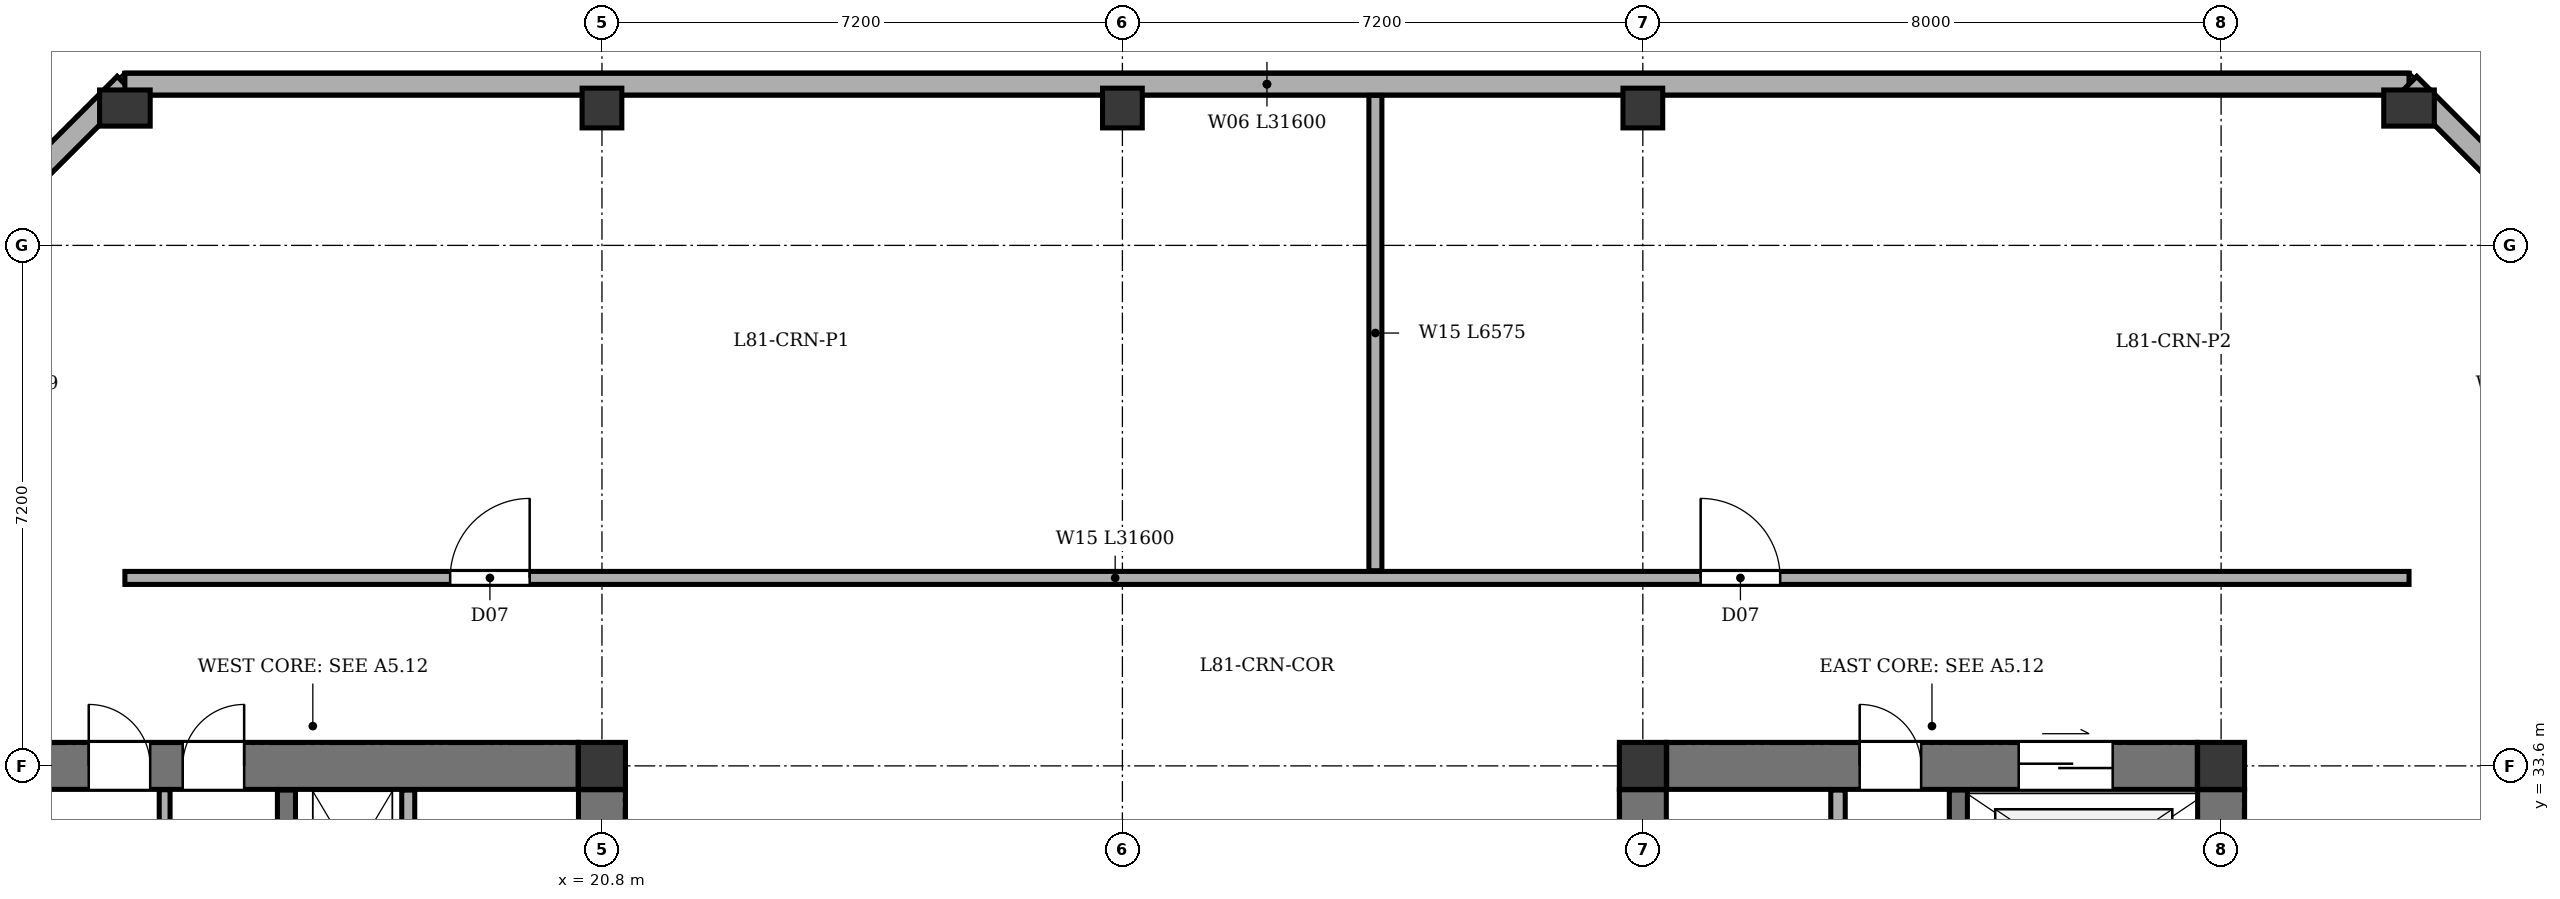
"""IFC4 building model, lengths in metres.
Left out: names, types, materials, properties, quantities, classifications, styles, units other than length and angle.
Written with IfcOpenShell. Run it as: python <this file> out.ifc"""

import sys

from ifc_helpers import new_model, si_unit, direction, frame, frame_2d, origin, origin_2d, place, context, subcontext, project, spatial, polyline, rectangle, outline, extrude, element, fill, save


model = new_model("IFC4")
c1 = context("Model", 3, precision=1e-05, world=origin(), true_north=direction((0.0, 1.0)))
c2 = subcontext(c1, "Body", "Model", "MODEL_VIEW")
j1 = project(units=[si_unit("LENGTHUNIT", "METRE"), si_unit("PLANEANGLEUNIT", "RADIAN")], contexts=[c1])
p1 = place(None, origin())
s1 = spatial("IfcSite", under=j1, at=p1, CompositionType="ELEMENT")
p2 = place(p1, origin())
s2 = spatial("IfcBuilding", under=s1, at=p2, CompositionType="ELEMENT")
p3 = place(p2, frame((0.0, 0.0, 309.0)))
s3 = spatial("IfcBuildingStorey", under=s2, at=p3, CompositionType="ELEMENT", Elevation=309.0)
for number, where, z_axis, x_axis in (
    (1, (20.8, 33.6, 0.0), (0.0, 0.0, 1.0), (1.0, 0.0, 0.0)),
    (2, (35.2, 33.6, 0.0), (0.0, 0.0, 1.0), (1.0, 0.0, 0.0)),
    (3, (43.2, 33.6, 0.0), (0.0, 0.0, 1.0), (1.0, 0.0, 0.0)),
):
    element("IfcColumn", number, at=place(p3, frame(where, z_axis=z_axis, x_axis=x_axis)), inside=s3, PredefinedType="COLUMN", context=c2, shape_type="SweptSolid", body=[
        extrude(rectangle(XDim=0.65, YDim=0.65, at=origin_2d()), origin(), (0.0, 0.0, 1.0), 4.2),
    ])
p4 = place(p3, frame((14.2, 42.7, 0.0), z_axis=(0.0, 0.0, 1.0), x_axis=(1.0, 0.0, 0.0)))
e4 = element("IfcColumn", 4, at=p4, inside=s3, PredefinedType="COLUMN", context=c2, shape_type="SweptSolid", body=[
    extrude(rectangle(XDim=0.5, YDim=0.7, at=origin_2d()), origin(), (0.0, 0.0, 1.0), 4.2),
])
for number, where, z_axis, x_axis in (
    (5, (20.8, 42.7, 0.0), (0.0, 0.0, 1.0), (1.0, 0.0, 0.0)),
    (6, (28.0, 42.7, 0.0), (0.0, 0.0, 1.0), (1.0, 0.0, 0.0)),
    (7, (35.2, 42.7, 0.0), (0.0, 0.0, 1.0), (1.0, 0.0, 0.0)),
):
    element("IfcColumn", number, at=place(p3, frame(where, z_axis=z_axis, x_axis=x_axis)), inside=s3, PredefinedType="COLUMN", context=c2, shape_type="SweptSolid", body=[
        extrude(rectangle(XDim=0.55, YDim=0.55, at=origin_2d()), origin(), (0.0, 0.0, 1.0), 4.2),
    ])
p5 = place(p3, frame((45.8, 42.7, 0.0), z_axis=(0.0, 0.0, 1.0), x_axis=(1.0, 0.0, 0.0)))
e8 = element("IfcColumn", 8, at=p5, inside=s3, PredefinedType="COLUMN", context=c2, shape_type="SweptSolid", body=[
    extrude(rectangle(XDim=0.5, YDim=0.7, at=origin_2d()), origin(), (0.0, 0.0, 1.0), 4.2),
])
p6 = place(p3, frame((10.87, 39.7, 0.0), z_axis=(0.0, 0.0, 1.0), x_axis=(0.707080859425, 0.707132701998, 0.0)))
e9 = element("IfcWall", 9, at=p6, inside=s3, PredefinedType="STANDARD", context=c2, shape_type="SweptSolid", body=[
    extrude(rectangle(XDim=4.709, YDim=0.3, at=frame_2d((2.354, 0.0))), origin(), (0.0, 0.0, 1.0), 3.98),
])
p7 = place(p3, frame((14.2, 43.03, 0.0), z_axis=(0.0, 0.0, 1.0), x_axis=(1.0, 0.0, 0.0)))
e10 = element("IfcWall", 10, at=p7, inside=s3, PredefinedType="STANDARD", context=c2, shape_type="SweptSolid", body=[
    extrude(rectangle(XDim=31.6, YDim=0.3, at=frame_2d((15.8, 0.0))), origin(), (0.0, 0.0, 1.0), 3.98),
])
p8 = place(p3, frame((45.8, 43.03, 0.0), z_axis=(0.0, 0.0, 1.0), x_axis=(0.707080859425, -0.707132701998, 0.0)))
e11 = element("IfcWall", 11, at=p8, inside=s3, PredefinedType="STANDARD", context=c2, shape_type="SweptSolid", body=[
    extrude(rectangle(XDim=4.709, YDim=0.3, at=frame_2d((2.354, 0.0))), origin(), (0.0, 0.0, 1.0), 3.98),
])
p9 = place(p3, frame((10.87, 39.7, 3.98), z_axis=(0.0, 0.0, 1.0), x_axis=(0.707080859425, 0.707132701998, 0.0)))
e12 = element("IfcWall", 12, at=p9, inside=s3, PredefinedType="STANDARD", context=c2, shape_type="SweptSolid", body=[
    extrude(outline(polyline([(0.0, 0.0), (4.709, 0.0), (4.709, 1.238), (0.0, 0.346), (0.0, 0.0)])), frame((0.0, 0.15, 0.0), z_axis=(0.0, -1.0, 0.0), x_axis=(1.0, 0.0, 0.0)), (0.0, 0.0, 1.0), 0.3),
])
p10 = place(p3, frame((14.2, 43.03, 3.98), z_axis=(0.0, 0.0, 1.0), x_axis=(1.0, 0.0, 0.0)))
e13 = element("IfcWall", 13, at=p10, inside=s3, PredefinedType="STANDARD", context=c2, shape_type="SweptSolid", body=[
    extrude(outline(polyline([(0.0, 0.0), (31.6, 0.0), (31.6, 9.705), (0.0, 1.238), (0.0, 0.0)])), frame((0.0, 0.15, 0.0), z_axis=(0.0, -1.0, 0.0), x_axis=(1.0, 0.0, 0.0)), (0.0, 0.0, 1.0), 0.3),
])
p11 = place(p3, frame((45.8, 43.03, 3.98), z_axis=(0.0, 0.0, 1.0), x_axis=(0.707080859425, -0.707132701998, 0.0)))
e14 = element("IfcWall", 14, at=p11, inside=s3, PredefinedType="STANDARD", context=c2, shape_type="SweptSolid", body=[
    extrude(outline(polyline([(0.0, 0.0), (4.709, 0.0), (4.709, 10.597), (0.0, 9.705), (0.0, 0.0)])), frame((0.0, 0.15, 0.0), z_axis=(0.0, -1.0, 0.0), x_axis=(1.0, 0.0, 0.0)), (0.0, 0.0, 1.0), 0.3),
])
p12 = place(p3, frame((13.13, 33.6, 0.0), z_axis=(0.0, 0.0, 1.0), x_axis=(1.0, 0.0, 0.0)))
e15 = element("IfcWall", 15, at=p12, inside=s3, PredefinedType="SHEAR", context=c2, shape_type="SweptSolid", body=[
    extrude(rectangle(XDim=7.34, YDim=0.65, at=frame_2d((3.67, 0.0))), origin(), (0.0, 0.0, 1.0), 4.28),
])
p13 = place(p12, frame((0.57, 0.0, 0.0)))
e16 = element("IfcOpeningElement", 16, at=p13, cuts=e15, PredefinedType="OPENING", context=c2, shape_type="SweptSolid", body=[
    extrude(rectangle(XDim=0.85, YDim=2.02, at=frame_2d((0.425, 1.01))), frame((0.0, 0.335, 0.0), z_axis=(0.0, -1.0, 0.0), x_axis=(1.0, 0.0, 0.0)), (0.0, 0.0, 1.0), 0.67),
])
p14 = place(p12, frame((1.87, 0.0, 0.0)))
e17 = element("IfcOpeningElement", 17, at=p14, cuts=e15, PredefinedType="OPENING", context=c2, shape_type="SweptSolid", body=[
    extrude(rectangle(XDim=0.85, YDim=2.02, at=frame_2d((0.425, 1.01))), frame((0.0, 0.335, 0.0), z_axis=(0.0, -1.0, 0.0), x_axis=(1.0, 0.0, 0.0)), (0.0, 0.0, 1.0), 0.67),
])
p15 = place(p3, frame((20.8, 31.1, 0.0), z_axis=(0.0, 0.0, 1.0), x_axis=(0.0, 1.0, 0.0)))
e18 = element("IfcWall", 18, at=p15, inside=s3, PredefinedType="SHEAR", context=c2, shape_type="SweptSolid", body=[
    extrude(rectangle(XDim=2.17, YDim=0.65, at=frame_2d((1.085, 0.0))), origin(), (0.0, 0.0, 1.0), 4.28),
])
p16 = place(p3, frame((16.435, 21.135, 0.0), z_axis=(0.0, 0.0, 1.0), x_axis=(0.0, 1.0, 0.0)))
e19 = element("IfcWall", 19, at=p16, inside=s3, PredefinedType="SHEAR", context=c2, shape_type="SweptSolid", body=[
    extrude(rectangle(XDim=12.13, YDim=0.25, at=frame_2d((6.065, 0.0))), origin(), (0.0, 0.0, 1.0), 4.28),
])
p17 = place(p16, frame((0.515, 0.0, 0.0)))
e20 = element("IfcOpeningElement", 20, at=p17, cuts=e19, PredefinedType="OPENING", context=c2, shape_type="SweptSolid", body=[
    extrude(rectangle(XDim=1.2, YDim=2.15, at=frame_2d((0.6, 1.075))), frame((0.0, 0.135, 0.0), z_axis=(0.0, -1.0, 0.0), x_axis=(1.0, 0.0, 0.0)), (0.0, 0.0, 1.0), 0.27),
])
p18 = place(p16, frame((2.665, 0.0, 0.0)))
e21 = element("IfcOpeningElement", 21, at=p18, cuts=e19, PredefinedType="OPENING", context=c2, shape_type="SweptSolid", body=[
    extrude(rectangle(XDim=1.15, YDim=2.15, at=frame_2d((0.575, 1.075))), frame((0.0, 0.135, 0.0), z_axis=(0.0, -1.0, 0.0), x_axis=(1.0, 0.0, 0.0)), (0.0, 0.0, 1.0), 0.27),
])
p19 = place(p3, frame((18.12, 31.17, 0.0), z_axis=(0.0, 0.0, 1.0), x_axis=(0.0, 1.0, 0.0)))
e22 = element("IfcWall", 22, at=p19, inside=s3, PredefinedType="PARTITIONING", context=c2, shape_type="SweptSolid", body=[
    extrude(rectangle(XDim=2.095, YDim=0.18, at=frame_2d((1.047, 0.0))), origin(), (0.0, 0.0, 1.0), 4.28),
])
p20 = place(p3, frame((43.2, 21.13, 0.0), z_axis=(0.0, 0.0, 1.0), x_axis=(0.0, 1.0, 0.0)))
e23 = element("IfcWall", 23, at=p20, inside=s3, PredefinedType="SHEAR", context=c2, shape_type="SweptSolid", body=[
    extrude(rectangle(XDim=12.14, YDim=0.65, at=frame_2d((6.07, 0.0))), origin(), (0.0, 0.0, 1.0), 4.28),
])
p21 = place(p3, frame((35.53, 33.6, 0.0), z_axis=(0.0, 0.0, 1.0), x_axis=(1.0, 0.0, 0.0)))
e24 = element("IfcWall", 24, at=p21, inside=s3, PredefinedType="SHEAR", context=c2, shape_type="SweptSolid", body=[
    extrude(rectangle(XDim=7.34, YDim=0.65, at=frame_2d((3.67, 0.0))), origin(), (0.0, 0.0, 1.0), 4.28),
])
p22 = place(p21, frame((4.87, 0.0, 0.0)))
e25 = element("IfcOpeningElement", 25, at=p22, cuts=e24, PredefinedType="OPENING", context=c2, shape_type="SweptSolid", body=[
    extrude(rectangle(XDim=1.3, YDim=2.15, at=frame_2d((0.65, 1.075))), frame((0.0, 0.335, 0.0), z_axis=(0.0, -1.0, 0.0), x_axis=(1.0, 0.0, 0.0)), (0.0, 0.0, 1.0), 0.67),
])
p23 = place(p21, frame((2.67, 0.0, 0.0)))
e26 = element("IfcOpeningElement", 26, at=p23, cuts=e24, PredefinedType="OPENING", context=c2, shape_type="SweptSolid", body=[
    extrude(rectangle(XDim=0.85, YDim=2.02, at=frame_2d((0.425, 1.01))), frame((0.0, 0.335, 0.0), z_axis=(0.0, -1.0, 0.0), x_axis=(1.0, 0.0, 0.0)), (0.0, 0.0, 1.0), 0.67),
])
p24 = place(p3, frame((35.2, 31.1, 0.0), z_axis=(0.0, 0.0, 1.0), x_axis=(0.0, 1.0, 0.0)))
e27 = element("IfcWall", 27, at=p24, inside=s3, PredefinedType="SHEAR", context=c2, shape_type="SweptSolid", body=[
    extrude(rectangle(XDim=2.17, YDim=0.65, at=frame_2d((1.085, 0.0))), origin(), (0.0, 0.0, 1.0), 4.28),
])
p25 = place(p3, frame((39.565, 21.135, 0.0), z_axis=(0.0, 0.0, 1.0), x_axis=(0.0, 1.0, 0.0)))
e28 = element("IfcWall", 28, at=p25, inside=s3, PredefinedType="SHEAR", context=c2, shape_type="SweptSolid", body=[
    extrude(rectangle(XDim=12.13, YDim=0.25, at=frame_2d((6.065, 0.0))), origin(), (0.0, 0.0, 1.0), 4.28),
])
p26 = place(p25, frame((0.515, 0.0, 0.0)))
e29 = element("IfcOpeningElement", 29, at=p26, cuts=e28, PredefinedType="OPENING", context=c2, shape_type="SweptSolid", body=[
    extrude(rectangle(XDim=1.2, YDim=2.15, at=frame_2d((0.6, 1.075))), frame((0.0, 0.135, 0.0), z_axis=(0.0, -1.0, 0.0), x_axis=(1.0, 0.0, 0.0)), (0.0, 0.0, 1.0), 0.27),
])
p27 = place(p25, frame((2.665, 0.0, 0.0)))
e30 = element("IfcOpeningElement", 30, at=p27, cuts=e28, PredefinedType="OPENING", context=c2, shape_type="SweptSolid", body=[
    extrude(rectangle(XDim=1.15, YDim=2.15, at=frame_2d((0.575, 1.075))), frame((0.0, 0.135, 0.0), z_axis=(0.0, -1.0, 0.0), x_axis=(1.0, 0.0, 0.0)), (0.0, 0.0, 1.0), 0.27),
])
p28 = place(p3, frame((37.9, 25.27, 0.0), z_axis=(0.0, 0.0, 1.0), x_axis=(0.0, 1.0, 0.0)))
e31 = element("IfcWall", 31, at=p28, inside=s3, PredefinedType="SOLIDWALL", context=c2, shape_type="SweptSolid", body=[
    extrude(rectangle(XDim=7.995, YDim=0.2, at=frame_2d((3.998, 0.0))), origin(), (0.0, 0.0, 1.0), 4.28),
])
p29 = place(p3, frame((14.75, 30.96, 0.0), z_axis=(0.0, 0.0, 1.0), x_axis=(0.0, 1.0, 0.0)))
e32 = element("IfcWall", 32, at=p29, inside=s3, PredefinedType="PARTITIONING", context=c2, shape_type="SweptSolid", body=[
    extrude(rectangle(XDim=2.31, YDim=0.15, at=frame_2d((1.155, 0.0))), origin(), (0.0, 0.0, 1.0), 3.88),
])
p30 = place(p29, frame((0.47, 0.0, 0.0)))
e33 = element("IfcOpeningElement", 33, at=p30, cuts=e32, PredefinedType="OPENING", context=c2, shape_type="SweptSolid", body=[
    extrude(rectangle(XDim=0.85, YDim=2.02, at=frame_2d((0.425, 1.01))), frame((0.0, 0.085, 0.0), z_axis=(0.0, -1.0, 0.0), x_axis=(1.0, 0.0, 0.0)), (0.0, 0.0, 1.0), 0.17),
])
p31 = place(p3, frame((14.2, 36.2, 0.0), z_axis=(0.0, 0.0, 1.0), x_axis=(1.0, 0.0, 0.0)))
e34 = element("IfcWall", 34, at=p31, inside=s3, PredefinedType="PARTITIONING", context=c2, shape_type="SweptSolid", body=[
    extrude(rectangle(XDim=31.6, YDim=0.18, at=frame_2d((15.8, 0.0))), origin(), (0.0, 0.0, 1.0), 3.88),
])
p32 = place(p31, frame((4.5, 0.0, 0.0)))
e35 = element("IfcOpeningElement", 35, at=p32, cuts=e34, PredefinedType="OPENING", context=c2, shape_type="SweptSolid", body=[
    extrude(rectangle(XDim=1.1, YDim=2.15, at=frame_2d((0.55, 1.075))), frame((0.0, 0.1, 0.0), z_axis=(0.0, -1.0, 0.0), x_axis=(1.0, 0.0, 0.0)), (0.0, 0.0, 1.0), 0.2),
])
p33 = place(p31, frame((21.8, 0.0, 0.0)))
e36 = element("IfcOpeningElement", 36, at=p33, cuts=e34, PredefinedType="OPENING", context=c2, shape_type="SweptSolid", body=[
    extrude(rectangle(XDim=1.1, YDim=2.15, at=frame_2d((0.55, 1.075))), frame((0.0, 0.1, 0.0), z_axis=(0.0, -1.0, 0.0), x_axis=(1.0, 0.0, 0.0)), (0.0, 0.0, 1.0), 0.2),
])
p34 = place(p3, frame((31.5, 36.3, 0.0), z_axis=(0.0, 0.0, 1.0), x_axis=(0.0, 1.0, 0.0)))
e37 = element("IfcWall", 37, at=p34, inside=s3, PredefinedType="PARTITIONING", context=c2, shape_type="SweptSolid", body=[
    extrude(rectangle(XDim=6.575, YDim=0.18, at=frame_2d((3.288, 0.0))), origin(), (0.0, 0.0, 1.0), 3.88),
])
p35 = place(p13, origin())
e38 = element("IfcDoor", 38, at=p35, inside=s3, OperationType="SINGLE_SWING_LEFT", PredefinedType="DOOR", context=c2, shape_type="SweptSolid", body=[
    extrude(rectangle(XDim=0.85, YDim=2.02, at=frame_2d((0.425, 1.01))), frame((0.0, 0.025, 0.0), z_axis=(0.0, -1.0, 0.0), x_axis=(1.0, 0.0, 0.0)), (0.0, 0.0, 1.0), 0.05),
])
fill(e16, e38)
p36 = place(p14, origin())
e39 = element("IfcDoor", 39, at=p36, inside=s3, OperationType="SINGLE_SWING_RIGHT", PredefinedType="DOOR", context=c2, shape_type="SweptSolid", body=[
    extrude(rectangle(XDim=0.85, YDim=2.02, at=frame_2d((0.425, 1.01))), frame((0.0, 0.025, 0.0), z_axis=(0.0, -1.0, 0.0), x_axis=(1.0, 0.0, 0.0)), (0.0, 0.0, 1.0), 0.05),
])
fill(e17, e39)
p37 = place(p22, origin())
e40 = element("IfcDoor", 40, at=p37, inside=s3, OperationType="DOUBLE_DOOR_SLIDING", PredefinedType="DOOR", context=c2, shape_type="SweptSolid", body=[
    extrude(rectangle(XDim=1.3, YDim=2.15, at=frame_2d((0.65, 1.075))), frame((0.0, 0.025, 0.0), z_axis=(0.0, -1.0, 0.0), x_axis=(1.0, 0.0, 0.0)), (0.0, 0.0, 1.0), 0.05),
])
fill(e25, e40)
p38 = place(p23, origin())
e41 = element("IfcDoor", 41, at=p38, inside=s3, OperationType="SINGLE_SWING_LEFT", PredefinedType="DOOR", context=c2, shape_type="SweptSolid", body=[
    extrude(rectangle(XDim=0.85, YDim=2.02, at=frame_2d((0.425, 1.01))), frame((0.0, 0.025, 0.0), z_axis=(0.0, -1.0, 0.0), x_axis=(1.0, 0.0, 0.0)), (0.0, 0.0, 1.0), 0.05),
])
fill(e26, e41)
p39 = place(p32, origin())
e42 = element("IfcDoor", 42, at=p39, inside=s3, OperationType="SINGLE_SWING_RIGHT", PredefinedType="DOOR", context=c2, shape_type="SweptSolid", body=[
    extrude(rectangle(XDim=1.1, YDim=2.15, at=frame_2d((0.55, 1.075))), frame((0.0, 0.025, 0.0), z_axis=(0.0, -1.0, 0.0), x_axis=(1.0, 0.0, 0.0)), (0.0, 0.0, 1.0), 0.05),
])
fill(e35, e42)
p40 = place(p33, origin())
e43 = element("IfcDoor", 43, at=p40, inside=s3, OperationType="SINGLE_SWING_LEFT", PredefinedType="DOOR", context=c2, shape_type="SweptSolid", body=[
    extrude(rectangle(XDim=1.1, YDim=2.15, at=frame_2d((0.55, 1.075))), frame((0.0, 0.025, 0.0), z_axis=(0.0, -1.0, 0.0), x_axis=(1.0, 0.0, 0.0)), (0.0, 0.0, 1.0), 0.05),
])
fill(e36, e43)
save(model, sys.argv[1])
